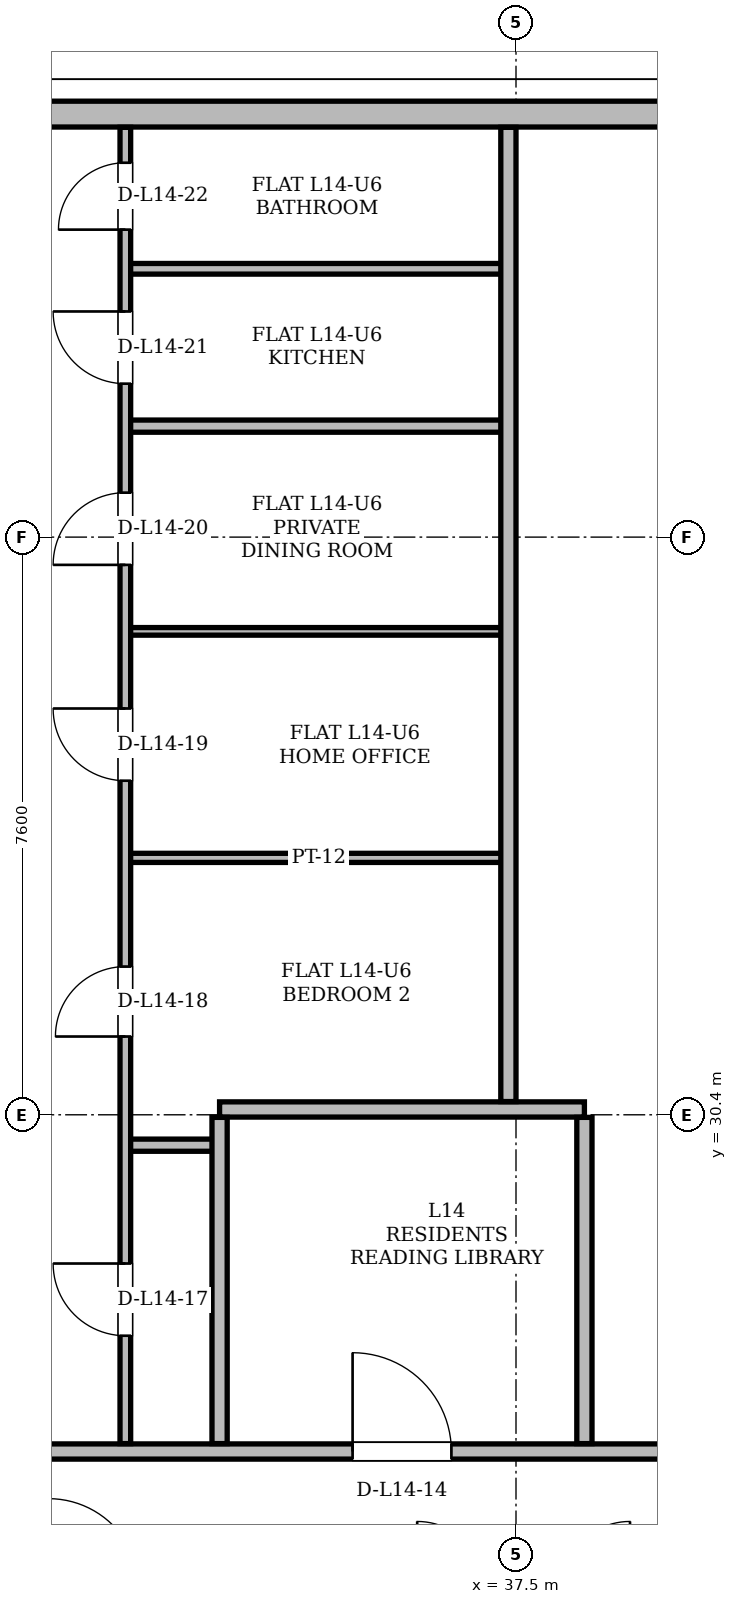
"""IFC4 building model, lengths in metres.
Left out: names, types, materials, properties, quantities, classifications, styles, units other than length and angle.
Written with IfcOpenShell. Run it as: python <this file> out.ifc"""

import sys

from ifc_helpers import new_model, si_unit, direction, frame, frame_2d, origin, place, context, subcontext, project, spatial, rectangle, extrude, element, fill, save


model = new_model("IFC4")
c1 = context("Model", 3, precision=1e-05, world=origin(), true_north=direction((0.0, 1.0)))
c2 = subcontext(c1, "Body", "Model", "MODEL_VIEW")
j1 = project(units=[si_unit("LENGTHUNIT", "METRE"), si_unit("PLANEANGLEUNIT", "RADIAN")], contexts=[c1])
p1 = place(None, origin())
s1 = spatial("IfcSite", under=j1, at=p1, CompositionType="ELEMENT")
p2 = place(p1, origin())
s2 = spatial("IfcBuilding", under=s1, at=p2, CompositionType="ELEMENT")
p3 = place(p2, frame((0.0, 0.0, 56.1)))
s3 = spatial("IfcBuildingStorey", under=s2, at=p3, CompositionType="ELEMENT", Elevation=56.1)
p4 = place(p3, frame((44.649, 43.565, 0.0), z_axis=(0.0, 0.0, 1.0), x_axis=(-1.0, 0.0, 0.0)))
e1 = element("IfcWall", 1, at=p4, inside=s3, PredefinedType="SOLIDWALL", context=c2, shape_type="SweptSolid", body=[
    extrude(rectangle(XDim=14.298, YDim=0.34, at=frame_2d((7.149, 0.0))), origin(), (0.0, 0.0, 1.0), 2.494),
])
p5 = place(p3, frame((27.55, 25.97, 0.0), z_axis=(0.0, 0.0, 1.0), x_axis=(1.0, 0.0, 0.0)))
e2 = element("IfcWall", 2, at=p5, inside=s3, PredefinedType="PARTITIONING", context=c2, shape_type="SweptSolid", body=[
    extrude(rectangle(XDim=19.9, YDim=0.2, at=frame_2d((9.95, 0.0))), origin(), (0.0, 0.0, 1.0), 2.738),
])
p6 = place(p5, frame((2.077, 0.0, 0.0)))
e3 = element("IfcOpeningElement", 3, at=p6, cuts=e2, PredefinedType="OPENING", context=c2, shape_type="SweptSolid", body=[
    extrude(rectangle(XDim=1.0, YDim=2.18, at=frame_2d((0.5, 1.09))), frame((0.0, 0.1, 0.0), z_axis=(0.0, -1.0, 0.0), x_axis=(1.0, 0.0, 0.0)), (0.0, 0.0, 1.0), 0.2),
])
p7 = place(p5, frame((7.8, 0.0, 0.0)))
e4 = element("IfcOpeningElement", 4, at=p7, cuts=e2, PredefinedType="OPENING", context=c2, shape_type="SweptSolid", body=[
    extrude(rectangle(XDim=1.3, YDim=2.2, at=frame_2d((0.65, 1.1))), frame((0.0, 0.1, 0.0), z_axis=(0.0, -1.0, 0.0), x_axis=(1.0, 0.0, 0.0)), (0.0, 0.0, 1.0), 0.2),
])
p8 = place(p3, frame((32.364, 30.0, 0.0), z_axis=(0.0, 0.0, 1.0), x_axis=(1.0, 0.0, 0.0)))
e5 = element("IfcWall", 5, at=p8, inside=s3, PredefinedType="PARTITIONING", context=c2, shape_type="SweptSolid", body=[
    extrude(rectangle(XDim=1.286, YDim=0.16, at=frame_2d((0.643, 0.0))), origin(), (0.0, 0.0, 1.0), 3.36),
])
p9 = place(p3, frame((33.6, 30.47, 0.0), z_axis=(0.0, 0.0, 1.0), x_axis=(1.0, 0.0, 0.0)))
e6 = element("IfcWall", 6, at=p9, inside=s3, PredefinedType="PARTITIONING", context=c2, shape_type="SweptSolid", body=[
    extrude(rectangle(XDim=4.8, YDim=0.2, at=frame_2d((2.4, 0.0))), origin(), (0.0, 0.0, 1.0), 3.36),
])
p10 = place(p3, frame((32.364, 33.78, 0.0), z_axis=(0.0, 0.0, 1.0), x_axis=(1.0, 0.0, 0.0)))
e7 = element("IfcWall", 7, at=p10, inside=s3, PredefinedType="PARTITIONING", context=c2, shape_type="SweptSolid", body=[
    extrude(rectangle(XDim=5.086, YDim=0.12, at=frame_2d((2.543, 0.0))), origin(), (0.0, 0.0, 1.0), 3.36),
])
p11 = place(p3, frame((32.364, 36.76, 0.0), z_axis=(0.0, 0.0, 1.0), x_axis=(1.0, 0.0, 0.0)))
e8 = element("IfcWall", 8, at=p11, inside=s3, PredefinedType="PARTITIONING", context=c2, shape_type="SweptSolid", body=[
    extrude(rectangle(XDim=5.086, YDim=0.1, at=frame_2d((2.543, 0.0))), origin(), (0.0, 0.0, 1.0), 3.36),
])
p12 = place(p3, frame((32.364, 39.46, 0.0), z_axis=(0.0, 0.0, 1.0), x_axis=(1.0, 0.0, 0.0)))
e9 = element("IfcWall", 9, at=p12, inside=s3, PredefinedType="PARTITIONING", context=c2, shape_type="SweptSolid", body=[
    extrude(rectangle(XDim=5.086, YDim=0.16, at=frame_2d((2.543, 0.0))), origin(), (0.0, 0.0, 1.0), 3.36),
])
p13 = place(p3, frame((32.364, 41.53, 0.0), z_axis=(0.0, 0.0, 1.0), x_axis=(1.0, 0.0, 0.0)))
e10 = element("IfcWall", 10, at=p13, inside=s3, PredefinedType="PARTITIONING", context=c2, shape_type="SweptSolid", body=[
    extrude(rectangle(XDim=5.086, YDim=0.14, at=frame_2d((2.543, 0.0))), origin(), (0.0, 0.0, 1.0), 3.36),
])
p14 = place(p3, frame((32.36, 26.074, 0.0), z_axis=(0.0, 0.0, 1.0), x_axis=(0.0, 1.0, 0.0)))
e11 = element("IfcWall", 11, at=p14, inside=s3, PredefinedType="PARTITIONING", context=c2, shape_type="SweptSolid", body=[
    extrude(rectangle(XDim=17.317, YDim=0.14, at=frame_2d((8.659, 0.0))), origin(), (0.0, 0.0, 1.0), 3.36),
])
p15 = place(p14, frame((1.419, 0.0, 0.0)))
e12 = element("IfcOpeningElement", 12, at=p15, cuts=e11, PredefinedType="OPENING", context=c2, shape_type="SweptSolid", body=[
    extrude(rectangle(XDim=0.95, YDim=2.1, at=frame_2d((0.475, 1.05))), frame((0.0, 0.07, 0.0), z_axis=(0.0, -1.0, 0.0), x_axis=(1.0, 0.0, 0.0)), (0.0, 0.0, 1.0), 0.14),
])
p16 = place(p14, frame((5.356, 0.0, 0.0)))
e13 = element("IfcOpeningElement", 13, at=p16, cuts=e11, PredefinedType="OPENING", context=c2, shape_type="SweptSolid", body=[
    extrude(rectangle(XDim=0.92, YDim=2.12, at=frame_2d((0.46, 1.06))), frame((0.0, 0.07, 0.0), z_axis=(0.0, -1.0, 0.0), x_axis=(1.0, 0.0, 0.0)), (0.0, 0.0, 1.0), 0.14),
])
p17 = place(p14, frame((8.721, 0.0, 0.0)))
e14 = element("IfcOpeningElement", 14, at=p17, cuts=e11, PredefinedType="OPENING", context=c2, shape_type="SweptSolid", body=[
    extrude(rectangle(XDim=0.95, YDim=2.1, at=frame_2d((0.475, 1.05))), frame((0.0, 0.07, 0.0), z_axis=(0.0, -1.0, 0.0), x_axis=(1.0, 0.0, 0.0)), (0.0, 0.0, 1.0), 0.14),
])
p18 = place(p14, frame((11.561, 0.0, 0.0)))
e15 = element("IfcOpeningElement", 15, at=p18, cuts=e11, PredefinedType="OPENING", context=c2, shape_type="SweptSolid", body=[
    extrude(rectangle(XDim=0.95, YDim=2.1, at=frame_2d((0.475, 1.05))), frame((0.0, 0.07, 0.0), z_axis=(0.0, -1.0, 0.0), x_axis=(1.0, 0.0, 0.0)), (0.0, 0.0, 1.0), 0.14),
])
p19 = place(p14, frame((13.945, 0.0, 0.0)))
e16 = element("IfcOpeningElement", 16, at=p19, cuts=e11, PredefinedType="OPENING", context=c2, shape_type="SweptSolid", body=[
    extrude(rectangle(XDim=0.95, YDim=2.1, at=frame_2d((0.475, 1.05))), frame((0.0, 0.07, 0.0), z_axis=(0.0, -1.0, 0.0), x_axis=(1.0, 0.0, 0.0)), (0.0, 0.0, 1.0), 0.14),
])
p20 = place(p14, frame((15.971, 0.0, 0.0)))
e17 = element("IfcOpeningElement", 17, at=p20, cuts=e11, PredefinedType="OPENING", context=c2, shape_type="SweptSolid", body=[
    extrude(rectangle(XDim=0.88, YDim=2.08, at=frame_2d((0.44, 1.04))), frame((0.0, 0.07, 0.0), z_axis=(0.0, -1.0, 0.0), x_axis=(1.0, 0.0, 0.0)), (0.0, 0.0, 1.0), 0.14),
])
p21 = place(p3, frame((33.6, 26.074, 0.0), z_axis=(0.0, 0.0, 1.0), x_axis=(0.0, 1.0, 0.0)))
e18 = element("IfcWall", 18, at=p21, inside=s3, PredefinedType="PARTITIONING", context=c2, shape_type="SweptSolid", body=[
    extrude(rectangle(XDim=4.292, YDim=0.2, at=frame_2d((2.146, 0.0))), origin(), (0.0, 0.0, 1.0), 3.36),
])
p22 = place(p3, frame((37.4, 30.574, 0.0), z_axis=(0.0, 0.0, 1.0), x_axis=(0.0, 1.0, 0.0)))
e19 = element("IfcWall", 19, at=p22, inside=s3, PredefinedType="PARTITIONING", context=c2, shape_type="SweptSolid", body=[
    extrude(rectangle(XDim=12.817, YDim=0.2, at=frame_2d((6.409, 0.0))), origin(), (0.0, 0.0, 1.0), 3.36),
])
p23 = place(p3, frame((38.4, 26.074, 0.0), z_axis=(0.0, 0.0, 1.0), x_axis=(0.0, 1.0, 0.0)))
e20 = element("IfcWall", 20, at=p23, inside=s3, PredefinedType="PARTITIONING", context=c2, shape_type="SweptSolid", body=[
    extrude(rectangle(XDim=4.292, YDim=0.2, at=frame_2d((2.146, 0.0))), origin(), (0.0, 0.0, 1.0), 3.36),
])
p24 = place(p7, origin())
e21 = element("IfcDoor", 21, at=p24, inside=s3, OperationType="SINGLE_SWING_LEFT", PredefinedType="DOOR", context=c2, shape_type="SweptSolid", body=[
    extrude(rectangle(XDim=1.3, YDim=2.2, at=frame_2d((0.65, 1.1))), frame((0.0, 0.025, 0.0), z_axis=(0.0, -1.0, 0.0), x_axis=(1.0, 0.0, 0.0)), (0.0, 0.0, 1.0), 0.05),
])
fill(e4, e21)
p25 = place(p15, origin())
e22 = element("IfcDoor", 22, at=p25, inside=s3, OperationType="SINGLE_SWING_RIGHT", PredefinedType="DOOR", context=c2, shape_type="SweptSolid", body=[
    extrude(rectangle(XDim=0.95, YDim=2.1, at=frame_2d((0.475, 1.05))), frame((0.0, 0.025, 0.0), z_axis=(0.0, -1.0, 0.0), x_axis=(1.0, 0.0, 0.0)), (0.0, 0.0, 1.0), 0.05),
])
fill(e12, e22)
p26 = place(p16, origin())
e23 = element("IfcDoor", 23, at=p26, inside=s3, OperationType="SINGLE_SWING_LEFT", PredefinedType="DOOR", context=c2, shape_type="SweptSolid", body=[
    extrude(rectangle(XDim=0.92, YDim=2.12, at=frame_2d((0.46, 1.06))), frame((0.0, 0.025, 0.0), z_axis=(0.0, -1.0, 0.0), x_axis=(1.0, 0.0, 0.0)), (0.0, 0.0, 1.0), 0.05),
])
fill(e13, e23)
p27 = place(p17, origin())
e24 = element("IfcDoor", 24, at=p27, inside=s3, OperationType="SINGLE_SWING_RIGHT", PredefinedType="DOOR", context=c2, shape_type="SweptSolid", body=[
    extrude(rectangle(XDim=0.95, YDim=2.1, at=frame_2d((0.475, 1.05))), frame((0.0, 0.025, 0.0), z_axis=(0.0, -1.0, 0.0), x_axis=(1.0, 0.0, 0.0)), (0.0, 0.0, 1.0), 0.05),
])
fill(e14, e24)
p28 = place(p18, origin())
e25 = element("IfcDoor", 25, at=p28, inside=s3, OperationType="SINGLE_SWING_LEFT", PredefinedType="DOOR", context=c2, shape_type="SweptSolid", body=[
    extrude(rectangle(XDim=0.95, YDim=2.1, at=frame_2d((0.475, 1.05))), frame((0.0, 0.025, 0.0), z_axis=(0.0, -1.0, 0.0), x_axis=(1.0, 0.0, 0.0)), (0.0, 0.0, 1.0), 0.05),
])
fill(e15, e25)
p29 = place(p19, origin())
e26 = element("IfcDoor", 26, at=p29, inside=s3, OperationType="SINGLE_SWING_RIGHT", PredefinedType="DOOR", context=c2, shape_type="SweptSolid", body=[
    extrude(rectangle(XDim=0.95, YDim=2.1, at=frame_2d((0.475, 1.05))), frame((0.0, 0.025, 0.0), z_axis=(0.0, -1.0, 0.0), x_axis=(1.0, 0.0, 0.0)), (0.0, 0.0, 1.0), 0.05),
])
fill(e16, e26)
p30 = place(p20, origin())
e27 = element("IfcDoor", 27, at=p30, inside=s3, OperationType="SINGLE_SWING_LEFT", PredefinedType="DOOR", context=c2, shape_type="SweptSolid", body=[
    extrude(rectangle(XDim=0.88, YDim=2.08, at=frame_2d((0.44, 1.04))), frame((0.0, 0.025, 0.0), z_axis=(0.0, -1.0, 0.0), x_axis=(1.0, 0.0, 0.0)), (0.0, 0.0, 1.0), 0.05),
])
fill(e17, e27)
save(model, sys.argv[1])
